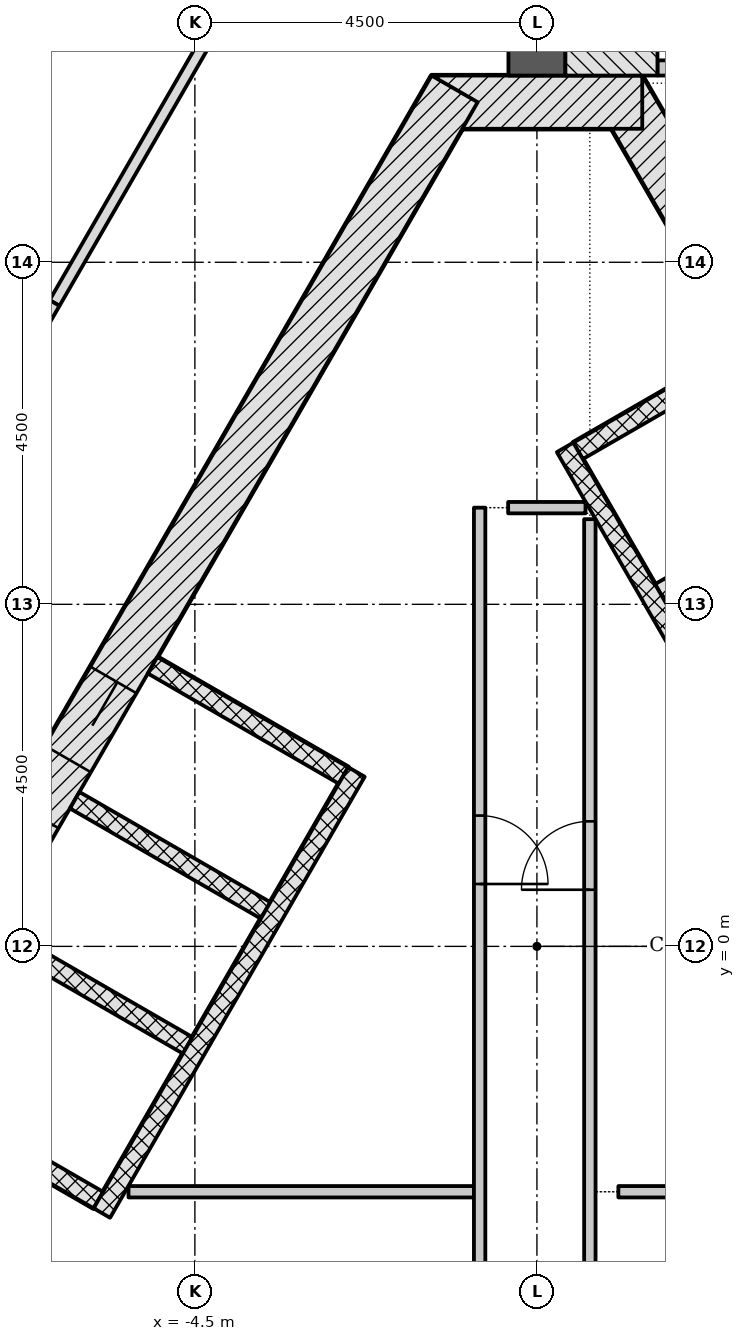
"""IFC4 building model, lengths in metres.
Left out: names, types, materials, properties, quantities, classifications, styles, units other than length and angle.
Written with IfcOpenShell. Run it as: python <this file> out.ifc"""

import sys

from ifc_helpers import new_model, si_unit, direction, frame, frame_2d, origin, place, context, subcontext, project, spatial, rectangle, extrude, element, fill, save


model = new_model("IFC4")
c1 = context("Model", 3, precision=1e-05, world=origin(), true_north=direction((0.0, 1.0)))
c2 = subcontext(c1, "Body", "Model", "MODEL_VIEW")
j1 = project(units=[si_unit("LENGTHUNIT", "METRE"), si_unit("PLANEANGLEUNIT", "RADIAN")], contexts=[c1])
p1 = place(None, origin())
s1 = spatial("IfcSite", under=j1, at=p1, CompositionType="ELEMENT")
p2 = place(p1, origin())
s2 = spatial("IfcBuilding", under=s1, at=p2, CompositionType="ELEMENT")
p3 = place(p2, frame((0.0, 0.0, 140.1)))
s3 = spatial("IfcBuildingStorey", under=s2, at=p3, CompositionType="ELEMENT", Elevation=140.1)
p4 = place(p3, frame((10.311, -4.703, -0.2), z_axis=(0.0, 0.0, 1.0), x_axis=(-0.500001446645, 0.866024568562, 0.0)))
e1 = element("IfcWall", 1, at=p4, inside=s3, PredefinedType="SHEAR", context=c2, shape_type="SweptSolid", body=[
    extrude(rectangle(XDim=18.458, YDim=0.7, at=frame_2d((9.229, 0.0))), origin(), (0.0, 0.0, 1.0), 3.6),
])
p5 = place(p4, frame((4.379, 0.0, 0.2)))
e2 = element("IfcOpeningElement", 2, at=p5, cuts=e1, PredefinedType="OPENING", context=c2, shape_type="SweptSolid", body=[
    extrude(rectangle(XDim=1.1, YDim=2.1, at=frame_2d((0.55, 1.05))), frame((0.0, 0.36, 0.0), z_axis=(0.0, -1.0, 0.0), x_axis=(1.0, 0.0, 0.0)), (0.0, 0.0, 1.0), 0.72),
])
p6 = place(p4, frame((6.529, 0.0, 0.2)))
e3 = element("IfcOpeningElement", 3, at=p6, cuts=e1, PredefinedType="OPENING", context=c2, shape_type="SweptSolid", body=[
    extrude(rectangle(XDim=1.1, YDim=2.1, at=frame_2d((0.55, 1.05))), frame((0.0, 0.36, 0.0), z_axis=(0.0, -1.0, 0.0), x_axis=(1.0, 0.0, 0.0)), (0.0, 0.0, 1.0), 0.72),
])
p7 = place(p4, frame((8.679, 0.0, 0.2)))
e4 = element("IfcOpeningElement", 4, at=p7, cuts=e1, PredefinedType="OPENING", context=c2, shape_type="SweptSolid", body=[
    extrude(rectangle(XDim=1.1, YDim=2.1, at=frame_2d((0.55, 1.05))), frame((0.0, 0.36, 0.0), z_axis=(0.0, -1.0, 0.0), x_axis=(1.0, 0.0, 0.0)), (0.0, 0.0, 1.0), 0.72),
])
p8 = place(p4, frame((10.829, 0.0, 0.2)))
e5 = element("IfcOpeningElement", 5, at=p8, cuts=e1, PredefinedType="OPENING", context=c2, shape_type="SweptSolid", body=[
    extrude(rectangle(XDim=1.1, YDim=2.1, at=frame_2d((0.55, 1.05))), frame((0.0, 0.36, 0.0), z_axis=(0.0, -1.0, 0.0), x_axis=(1.0, 0.0, 0.0)), (0.0, 0.0, 1.0), 0.72),
])
p9 = place(p4, frame((12.979, 0.0, 0.2)))
e6 = element("IfcOpeningElement", 6, at=p9, cuts=e1, PredefinedType="OPENING", context=c2, shape_type="SweptSolid", body=[
    extrude(rectangle(XDim=1.1, YDim=2.1, at=frame_2d((0.55, 1.05))), frame((0.0, 0.36, 0.0), z_axis=(0.0, -1.0, 0.0), x_axis=(1.0, 0.0, 0.0)), (0.0, 0.0, 1.0), 0.72),
])
p10 = place(p3, frame((1.386, 11.106, -0.2), z_axis=(0.0, 0.0, 1.0), x_axis=(-1.0, 0.0, 0.0)))
e7 = element("IfcWall", 7, at=p10, inside=s3, PredefinedType="SHEAR", context=c2, shape_type="SweptSolid", body=[
    extrude(rectangle(XDim=2.771, YDim=0.7, at=frame_2d((1.386, 0.0))), origin(), (0.0, 0.0, 1.0), 3.6),
])
p11 = place(p3, frame((-1.083, 11.281, -0.2), z_axis=(0.0, 0.0, 1.0), x_axis=(-0.500001446645, -0.866024568562, 0.0)))
e8 = element("IfcWall", 8, at=p11, inside=s3, PredefinedType="SHEAR", context=c2, shape_type="SweptSolid", body=[
    extrude(rectangle(XDim=18.458, YDim=0.7, at=frame_2d((9.229, 0.0))), origin(), (0.0, 0.0, 1.0), 3.6),
])
p12 = place(p11, frame((8.979, 0.0, 0.2)))
e9 = element("IfcOpeningElement", 9, at=p12, cuts=e8, PredefinedType="OPENING", context=c2, shape_type="SweptSolid", body=[
    extrude(rectangle(XDim=1.2, YDim=2.1, at=frame_2d((0.6, 1.05))), frame((0.0, 0.36, 0.0), z_axis=(0.0, -1.0, 0.0), x_axis=(1.0, 0.0, 0.0)), (0.0, 0.0, 1.0), 0.72),
])
p13 = place(p11, frame((11.029, 0.0, 0.2)))
e10 = element("IfcOpeningElement", 10, at=p13, cuts=e8, PredefinedType="OPENING", context=c2, shape_type="SweptSolid", body=[
    extrude(rectangle(XDim=1.2, YDim=2.1, at=frame_2d((0.6, 1.05))), frame((0.0, 0.36, 0.0), z_axis=(0.0, -1.0, 0.0), x_axis=(1.0, 0.0, 0.0)), (0.0, 0.0, 1.0), 0.72),
])
p14 = place(p3, frame((0.0, 11.456, -0.2), z_axis=(0.0, 0.0, 1.0), x_axis=(0.0, 1.0, 0.0)))
e11 = element("IfcWall", 11, at=p14, inside=s3, PredefinedType="SHEAR", context=c2, shape_type="SweptSolid", body=[
    extrude(rectangle(XDim=11.167, YDim=0.75, at=frame_2d((5.583, 0.0))), origin(), (0.0, 0.0, 1.0), 3.6),
])
for number, where, z_axis, x_axis in (
    (12, (3.781, 5.907, -0.2), (0.0, 0.0, 1.0), (-0.866, -0.5, 0.0)),
    (13, (2.706, 7.769, -0.2), (0.0, 0.0, 1.0), (-0.866, -0.5, 0.0)),
):
    element("IfcWall", number, at=place(p3, frame(where, z_axis=z_axis, x_axis=x_axis)), inside=s3, PredefinedType="PARTITIONING", context=c2, shape_type="SweptSolid", body=[
        extrude(rectangle(XDim=2.5, YDim=0.25, at=frame_2d((1.25, 0.0))), origin(), (0.0, 0.0, 1.0), 3.6),
    ])
p15 = place(p3, frame((5.87, -2.961, 0.0), z_axis=(0.0, 0.0, 1.0), x_axis=(-0.50000615651, 0.866021849293, 0.0)))
e14 = element("IfcWall", 14, at=p15, inside=s3, PredefinedType="PARTITIONING", context=c2, shape_type="SweptSolid", body=[
    extrude(rectangle(XDim=11.0, YDim=0.25, at=frame_2d((5.5, 0.0))), origin(), (0.0, 0.0, 1.0), 3.4),
])
for number, where, z_axis, x_axis in (
    (15, (-5.056, 3.699, -0.2), (0.0, 0.0, 1.0), (0.866, -0.5, 0.0)),
    (16, (-6.081, 1.923, -0.2), (0.0, 0.0, 1.0), (0.866, -0.5, 0.0)),
    (17, (-7.106, 0.148, -0.2), (0.0, 0.0, 1.0), (0.866, -0.5, 0.0)),
    (18, (-8.281, -1.887, -0.2), (0.0, 0.0, 1.0), (0.866, -0.5, 0.0)),
):
    element("IfcWall", number, at=place(p3, frame(where, z_axis=z_axis, x_axis=x_axis)), inside=s3, PredefinedType="PARTITIONING", context=c2, shape_type="SweptSolid", body=[
        extrude(rectangle(XDim=2.9, YDim=0.25, at=frame_2d((1.45, 0.0))), origin(), (0.0, 0.0, 1.0), 3.6),
    ])
p16 = place(p3, frame((-2.374, 2.294, 0.0), z_axis=(0.0, 0.0, 1.0), x_axis=(-0.500003174267, -0.866023571113, 0.0)))
e19 = element("IfcWall", 19, at=p16, inside=s3, PredefinedType="PARTITIONING", context=c2, shape_type="SweptSolid", body=[
    extrude(rectangle(XDim=6.7, YDim=0.25, at=frame_2d((3.35, 0.0))), origin(), (0.0, 0.0, 1.0), 3.4),
])
p17 = place(p3, frame((-5.373, -3.228, 0.0), z_axis=(0.0, 0.0, 1.0), x_axis=(1.0, 0.0, 0.0)))
e20 = element("IfcWall", 20, at=p17, inside=s3, PredefinedType="PARTITIONING", context=c2, shape_type="SweptSolid", body=[
    extrude(rectangle(XDim=4.545, YDim=0.15, at=frame_2d((2.272, 0.0))), origin(), (0.0, 0.0, 1.0), 3.4),
])
p18 = place(p3, frame((-0.754, 5.772, 0.0), z_axis=(0.0, 0.0, 1.0), x_axis=(0.0, -1.0, 0.0)))
e21 = element("IfcWall", 21, at=p18, inside=s3, PredefinedType="PARTITIONING", context=c2, shape_type="SweptSolid", body=[
    extrude(rectangle(XDim=12.0, YDim=0.15, at=frame_2d((6.0, 0.0))), origin(), (0.0, 0.0, 1.0), 3.4),
])
p19 = place(p18, frame((4.051, 0.0, 0.0)))
e22 = element("IfcOpeningElement", 22, at=p19, cuts=e21, PredefinedType="OPENING", context=c2, shape_type="SweptSolid", body=[
    extrude(rectangle(XDim=0.9, YDim=2.1, at=frame_2d((0.45, 1.05))), frame((0.0, 0.085, 0.0), z_axis=(0.0, -1.0, 0.0), x_axis=(1.0, 0.0, 0.0)), (0.0, 0.0, 1.0), 0.17),
])
p20 = place(p3, frame((-0.379, 5.772, 0.0), z_axis=(0.0, 0.0, 1.0), x_axis=(1.0, 0.0, 0.0)))
e23 = element("IfcWall", 23, at=p20, inside=s3, PredefinedType="PARTITIONING", context=c2, shape_type="SweptSolid", body=[
    extrude(rectangle(XDim=1.018, YDim=0.15, at=frame_2d((0.509, 0.0))), origin(), (0.0, 0.0, 1.0), 3.4),
])
p21 = place(p3, frame((0.696, -5.928, 0.0), z_axis=(0.0, 0.0, 1.0), x_axis=(0.0, 1.0, 0.0)))
e24 = element("IfcWall", 24, at=p21, inside=s3, PredefinedType="PARTITIONING", context=c2, shape_type="SweptSolid", body=[
    extrude(rectangle(XDim=11.549, YDim=0.15, at=frame_2d((5.774, 0.0))), origin(), (0.0, 0.0, 1.0), 3.4),
])
p22 = place(p21, frame((6.673, 0.0, 0.0)))
e25 = element("IfcOpeningElement", 25, at=p22, cuts=e24, PredefinedType="OPENING", context=c2, shape_type="SweptSolid", body=[
    extrude(rectangle(XDim=0.9, YDim=2.1, at=frame_2d((0.45, 1.05))), frame((0.0, 0.085, 0.0), z_axis=(0.0, -1.0, 0.0), x_axis=(1.0, 0.0, 0.0)), (0.0, 0.0, 1.0), 0.17),
])
p23 = place(p3, frame((1.071, -3.228, 0.0), z_axis=(0.0, 0.0, 1.0), x_axis=(1.0, 0.0, 0.0)))
e26 = element("IfcWall", 26, at=p23, inside=s3, PredefinedType="PARTITIONING", context=c2, shape_type="SweptSolid", body=[
    extrude(rectangle(XDim=7.939, YDim=0.15, at=frame_2d((3.97, 0.0))), origin(), (0.0, 0.0, 1.0), 3.4),
])
p24 = place(p3, frame((5.135, 11.556, -0.2), z_axis=(0.0, 0.0, 1.0), x_axis=(-1.0, 0.0, 0.0)))
e27 = element("IfcWall", 27, at=p24, inside=s3, PredefinedType="SHEAR", context=c2, shape_type="SweptSolid", body=[
    extrude(rectangle(XDim=3.55, YDim=0.2, at=frame_2d((1.775, 0.0))), origin(), (0.0, 0.0, 1.0), 3.6),
])
p25 = place(p24, frame((1.175, 0.0, 0.2)))
e28 = element("IfcOpeningElement", 28, at=p25, cuts=e27, PredefinedType="OPENING", context=c2, shape_type="SweptSolid", body=[
    extrude(rectangle(XDim=1.2, YDim=2.1, at=frame_2d((0.6, 1.05))), frame((0.0, 0.11, 0.0), z_axis=(0.0, -1.0, 0.0), x_axis=(1.0, 0.0, 0.0)), (0.0, 0.0, 1.0), 0.22),
])
p26 = place(p3, frame((0.98, 11.456, -0.2), z_axis=(0.0, 0.0, 1.0), x_axis=(0.0, 1.0, 0.0)))
e29 = element("IfcWall", 29, at=p26, inside=s3, PredefinedType="SHEAR", context=c2, shape_type="SweptSolid", body=[
    extrude(rectangle(XDim=7.2, YDim=1.211, at=frame_2d((3.6, 0.0))), origin(), (0.0, 0.0, 1.0), 3.6),
])
p27 = place(p3, frame((-0.375, 18.807, 0.0), z_axis=(0.0, 0.0, 1.0), x_axis=(-0.499995562011, -0.866027966043, 0.0)))
e30 = element("IfcWall", 30, at=p27, inside=s3, PredefinedType="PARTITIONING", context=c2, shape_type="SweptSolid", body=[
    extrude(rectangle(XDim=11.942, YDim=0.15, at=frame_2d((5.971, 0.0))), origin(), (0.0, 0.0, 1.0), 2.852),
])
p28 = place(p3, frame((-11.695, 11.7, 0.0), z_axis=(0.0, 0.0, 1.0), x_axis=(0.855596827578, -0.517642800238, 0.0)))
e31 = element("IfcWall", 31, at=p28, inside=s3, PredefinedType="PARTITIONING", context=c2, shape_type="SweptSolid", body=[
    extrude(rectangle(XDim=6.177, YDim=0.15, at=frame_2d((3.088, 0.0))), origin(), (0.0, 0.0, 1.0), 3.4),
])
p29 = place(p28, frame((2.626, 0.0, 0.0)))
e32 = element("IfcOpeningElement", 32, at=p29, cuts=e31, PredefinedType="OPENING", context=c2, shape_type="SweptSolid", body=[
    extrude(rectangle(XDim=1.0, YDim=2.1, at=frame_2d((0.5, 1.05))), frame((0.0, 0.085, 0.0), z_axis=(0.0, -1.0, 0.0), x_axis=(1.0, 0.0, 0.0)), (0.0, 0.0, 1.0), 0.17),
])
p30 = place(p3, frame((-6.346, 8.464, 0.0), z_axis=(0.0, 0.0, 1.0), x_axis=(-0.50001992892, -0.866013897511, 0.0)))
e33 = element("IfcWall", 33, at=p30, inside=s3, PredefinedType="PARTITIONING", context=c2, shape_type="SweptSolid", body=[
    extrude(rectangle(XDim=4.357, YDim=0.15, at=frame_2d((2.179, 0.0))), origin(), (0.0, 0.0, 1.0), 2.847),
])
p31 = place(p30, frame((1.678, 0.0, 0.0)))
e34 = element("IfcOpeningElement", 34, at=p31, cuts=e33, PredefinedType="OPENING", context=c2, shape_type="SweptSolid", body=[
    extrude(rectangle(XDim=1.0, YDim=2.1, at=frame_2d((0.5, 1.05))), frame((0.0, 0.085, 0.0), z_axis=(0.0, -1.0, 0.0), x_axis=(1.0, 0.0, 0.0)), (0.0, 0.0, 1.0), 0.17),
])
p32 = place(p12, origin())
e35 = element("IfcDoor", 35, at=p32, inside=s3, OperationType="DOUBLE_DOOR_SLIDING", PredefinedType="DOOR", context=c2, shape_type="SweptSolid", body=[
    extrude(rectangle(XDim=1.2, YDim=2.1, at=frame_2d((0.6, 1.05))), frame((0.0, 0.025, 0.0), z_axis=(0.0, -1.0, 0.0), x_axis=(1.0, 0.0, 0.0)), (0.0, 0.0, 1.0), 0.05),
])
fill(e9, e35)
p33 = place(p19, origin())
e36 = element("IfcDoor", 36, at=p33, inside=s3, OperationType="SINGLE_SWING_RIGHT", PredefinedType="DOOR", context=c2, shape_type="SweptSolid", body=[
    extrude(rectangle(XDim=0.9, YDim=2.1, at=frame_2d((0.45, 1.05))), frame((0.0, 0.025, 0.0), z_axis=(0.0, -1.0, 0.0), x_axis=(1.0, 0.0, 0.0)), (0.0, 0.0, 1.0), 0.05),
])
fill(e22, e36)
p34 = place(p22, origin())
e37 = element("IfcDoor", 37, at=p34, inside=s3, OperationType="SINGLE_SWING_LEFT", PredefinedType="DOOR", context=c2, shape_type="SweptSolid", body=[
    extrude(rectangle(XDim=0.9, YDim=2.1, at=frame_2d((0.45, 1.05))), frame((0.0, 0.025, 0.0), z_axis=(0.0, -1.0, 0.0), x_axis=(1.0, 0.0, 0.0)), (0.0, 0.0, 1.0), 0.05),
])
fill(e25, e37)
save(model, sys.argv[1])
